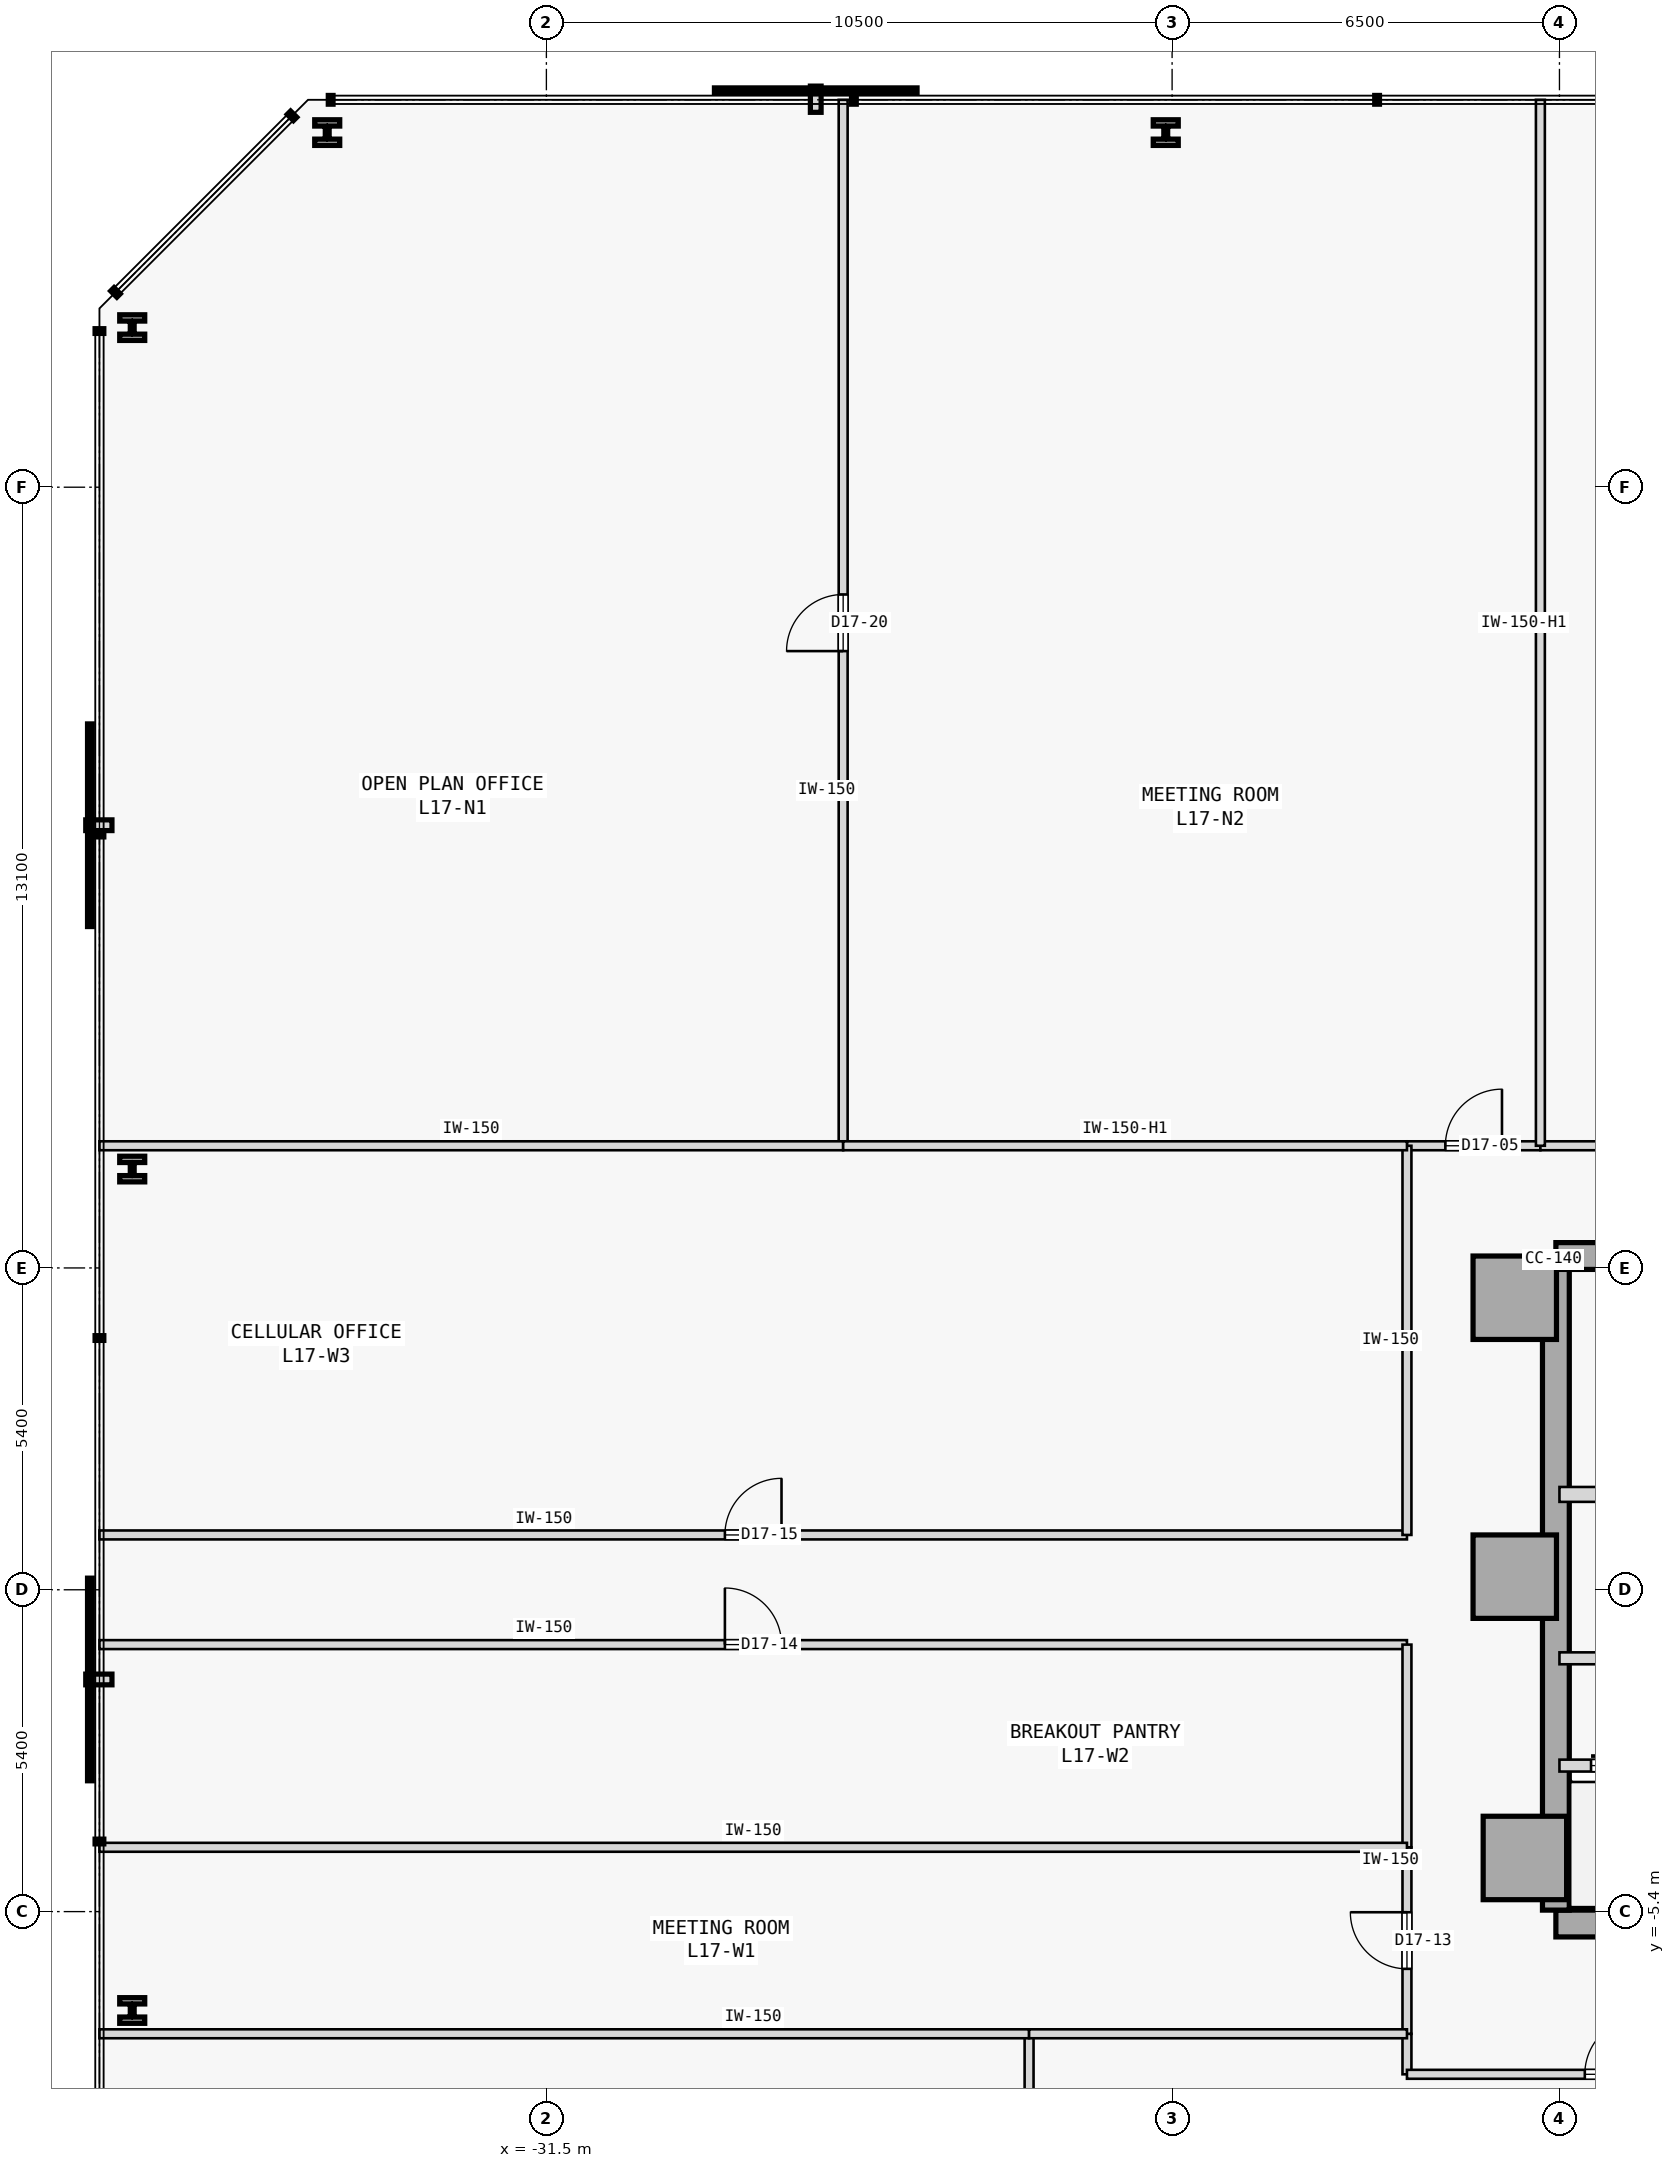
"""IFC4 building model, lengths in metres.
Left out: names, types, materials, properties, quantities, classifications, styles, units other than length and angle.
Written with IfcOpenShell. Run it as: python <this file> out.ifc"""

import sys

from ifc_helpers import new_model, si_unit, direction, frame, frame_2d, origin, origin_2d, place, context, subcontext, project, spatial, rectangle, i_section, extrude, element, fill, save


model = new_model("IFC4")
c1 = context("Model", 3, precision=1e-05, world=origin(), true_north=direction((0.0, 1.0)))
c2 = subcontext(c1, "Body", "Model", "MODEL_VIEW")
j1 = project(units=[si_unit("LENGTHUNIT", "METRE"), si_unit("PLANEANGLEUNIT", "RADIAN")], contexts=[c1])
p1 = place(None, origin())
s1 = spatial("IfcSite", under=j1, at=p1, CompositionType="ELEMENT")
p2 = place(p1, origin())
s2 = spatial("IfcBuilding", under=s1, at=p2, CompositionType="ELEMENT")
p3 = place(p2, frame((0.0, 0.0, 71.2)))
s3 = spatial("IfcBuildingStorey", under=s2, at=p3, CompositionType="ELEMENT", Elevation=71.2)
for number, where, z_axis, x_axis in (
    (1, (-15.25, 4.9, 0.0), (0.0, 0.0, 1.0), (1.0, 0.0, 0.0)),
    (2, (-15.25, 0.22, 0.0), (0.0, 0.0, 1.0), (1.0, 0.0, 0.0)),
    (3, (-15.08, -4.5, 0.0), (0.0, 0.0, 1.0), (1.0, 0.0, 0.0)),
):
    element("IfcColumn", number, at=place(p3, frame(where, z_axis=z_axis, x_axis=x_axis)), inside=s3, PredefinedType="COLUMN", context=c2, shape_type="SweptSolid", body=[
        extrude(rectangle(XDim=1.4, YDim=1.4, at=origin_2d()), origin(), (0.0, 0.0, 1.0), 3.8),
    ])
p4 = place(p3, frame((-14.56, 5.6, 0.0), z_axis=(0.0, 0.0, 1.0), x_axis=(1.0, 0.0, 0.0)))
e4 = element("IfcWall", 4, at=p4, inside=s3, PredefinedType="SHEAR", context=c2, shape_type="SweptSolid", body=[
    extrude(rectangle(XDim=11.41, YDim=0.45, at=frame_2d((5.705, 0.0))), origin(), (0.0, 0.0, 1.0), 3.575),
])
p5 = place(p3, frame((-14.56, -5.6, 0.0), z_axis=(0.0, 0.0, 1.0), x_axis=(1.0, 0.0, 0.0)))
e5 = element("IfcWall", 5, at=p5, inside=s3, PredefinedType="SHEAR", context=c2, shape_type="SweptSolid", body=[
    extrude(rectangle(XDim=10.86, YDim=0.45, at=frame_2d((5.43, 0.0))), origin(), (0.0, 0.0, 1.0), 3.575),
])
p6 = place(p3, frame((-14.56, -5.375, 0.0), z_axis=(0.0, 0.0, 1.0), x_axis=(0.0, 1.0, 0.0)))
e6 = element("IfcWall", 6, at=p6, inside=s3, PredefinedType="SHEAR", context=c2, shape_type="SweptSolid", body=[
    extrude(rectangle(XDim=10.75, YDim=0.45, at=frame_2d((5.375, 0.0))), origin(), (0.0, 0.0, 1.0), 3.575),
])
for number, where, z_axis, x_axis in (
    (7, (-21.107, 24.45, 0.0), (0.0, 0.0, 1.0), (1.0, 0.0, 0.0)),
    (8, (-35.178, 24.45, 0.0), (0.0, 0.0, 1.0), (1.0, 0.0, 0.0)),
    (9, (-38.45, 21.178, 0.0), (0.0, 0.0, 1.0), (1.0, 0.0, 0.0)),
    (10, (-38.45, 7.059, 0.0), (0.0, 0.0, 1.0), (1.0, 0.0, 0.0)),
    (11, (-38.45, -7.059, 0.0), (0.0, 0.0, 1.0), (1.0, 0.0, 0.0)),
):
    element("IfcColumn", number, at=place(p3, frame(where, z_axis=z_axis, x_axis=x_axis)), inside=s3, PredefinedType="COLUMN", context=c2, shape_type="SweptSolid", body=[
        extrude(i_section(OverallWidth=0.42, OverallDepth=0.431, WebThickness=0.065, FlangeThickness=0.106, FilletRadius=0.015, at=origin_2d()), origin(), (0.0, 0.0, 1.0), 3.8),
    ])
p7 = place(p3, frame((-14.5, 1.6, 0.0), z_axis=(0.0, 0.0, 1.0), x_axis=(1.0, 0.0, 0.0)))
e12 = element("IfcWall", 12, at=p7, inside=s3, PredefinedType="STANDARD", context=c2, shape_type="SweptSolid", body=[
    extrude(rectangle(XDim=3.6, YDim=0.25, at=frame_2d((1.8, 0.0))), origin(), (0.0, 0.0, 1.0), 3.575),
])
p8 = place(p7, frame((0.92, 0.0, 0.0)))
e13 = element("IfcOpeningElement", 13, at=p8, cuts=e12, PredefinedType="OPENING", context=c2, shape_type="SweptSolid", body=[
    extrude(rectangle(XDim=1.05, YDim=2.15, at=frame_2d((0.525, 1.075))), frame((0.0, 0.135, 0.0), z_axis=(0.0, -1.0, 0.0), x_axis=(1.0, 0.0, 0.0)), (0.0, 0.0, 1.0), 0.27),
])
p9 = place(p3, frame((-14.5, -1.15, 0.0), z_axis=(0.0, 0.0, 1.0), x_axis=(1.0, 0.0, 0.0)))
e14 = element("IfcWall", 14, at=p9, inside=s3, PredefinedType="STANDARD", context=c2, shape_type="SweptSolid", body=[
    extrude(rectangle(XDim=2.95, YDim=0.2, at=frame_2d((1.475, 0.0))), origin(), (0.0, 0.0, 1.0), 3.575),
])
p10 = place(p9, frame((0.75, 0.0, 0.0)))
e15 = element("IfcOpeningElement", 15, at=p10, cuts=e14, PredefinedType="OPENING", context=c2, shape_type="SweptSolid", body=[
    extrude(rectangle(XDim=1.05, YDim=2.18, at=frame_2d((0.525, 1.09))), frame((0.0, 0.11, 0.0), z_axis=(0.0, -1.0, 0.0), x_axis=(1.0, 0.0, 0.0)), (0.0, 0.0, 1.0), 0.22),
])
p11 = place(p3, frame((-14.5, -2.95, 0.0), z_axis=(0.0, 0.0, 1.0), x_axis=(1.0, 0.0, 0.0)))
e16 = element("IfcWall", 16, at=p11, inside=s3, PredefinedType="STANDARD", context=c2, shape_type="SweptSolid", body=[
    extrude(rectangle(XDim=10.8, YDim=0.2, at=frame_2d((5.4, 0.0))), origin(), (0.0, 0.0, 1.0), 3.575),
])
p12 = place(p11, frame((0.53, 0.0, 0.0)))
e17 = element("IfcOpeningElement", 17, at=p12, cuts=e16, PredefinedType="OPENING", context=c2, shape_type="SweptSolid", body=[
    extrude(rectangle(XDim=1.1, YDim=2.15, at=frame_2d((0.55, 1.075))), frame((0.0, 0.11, 0.0), z_axis=(0.0, -1.0, 0.0), x_axis=(1.0, 0.0, 0.0)), (0.0, 0.0, 1.0), 0.22),
])
p13 = place(p11, frame((2.69, 0.0, 0.0)))
e18 = element("IfcOpeningElement", 18, at=p13, cuts=e16, PredefinedType="OPENING", context=c2, shape_type="SweptSolid", body=[
    extrude(rectangle(XDim=1.1, YDim=2.15, at=frame_2d((0.55, 1.075))), frame((0.0, 0.11, 0.0), z_axis=(0.0, -1.0, 0.0), x_axis=(1.0, 0.0, 0.0)), (0.0, 0.0, 1.0), 0.22),
])
p14 = place(p3, frame((-17.059, 7.45, 0.0), z_axis=(0.0, 0.0, 1.0), x_axis=(1.0, 0.0, 0.0)))
e19 = element("IfcWall", 19, at=p14, inside=s3, PredefinedType="PARTITIONING", context=c2, shape_type="SweptSolid", body=[
    extrude(rectangle(XDim=2.239, YDim=0.15, at=frame_2d((1.12, 0.0))), origin(), (0.0, 0.0, 1.0), 3.575),
])
p15 = place(p14, frame((0.645, 0.0, 0.0)))
e20 = element("IfcOpeningElement", 20, at=p15, cuts=e19, PredefinedType="OPENING", context=c2, shape_type="SweptSolid", body=[
    extrude(rectangle(XDim=0.95, YDim=2.15, at=frame_2d((0.475, 1.075))), frame((0.0, 0.085, 0.0), z_axis=(0.0, -1.0, 0.0), x_axis=(1.0, 0.0, 0.0)), (0.0, 0.0, 1.0), 0.17),
])
p16 = place(p3, frame((-14.82, 7.45, 0.0), z_axis=(0.0, 0.0, 1.0), x_axis=(1.0, 0.0, 0.0)))
e21 = element("IfcWall", 21, at=p16, inside=s3, PredefinedType="PARTITIONING", context=c2, shape_type="SweptSolid", body=[
    extrude(rectangle(XDim=13.9, YDim=0.15, at=frame_2d((6.95, 0.0))), origin(), (0.0, 0.0, 1.0), 3.575),
])
p17 = place(p3, frame((-17.059, -8.13, 0.0), z_axis=(0.0, 0.0, 1.0), x_axis=(0.0, 1.0, 0.0)))
e22 = element("IfcWall", 22, at=p17, inside=s3, PredefinedType="PARTITIONING", context=c2, shape_type="SweptSolid", body=[
    extrude(rectangle(XDim=0.68, YDim=0.15, at=frame_2d((0.34, 0.0))), origin(), (0.0, 0.0, 1.0), 3.575),
])
p18 = place(p3, frame((-17.059, -8.13, 0.0), z_axis=(0.0, 0.0, 1.0), x_axis=(1.0, 0.0, 0.0)))
e23 = element("IfcWall", 23, at=p18, inside=s3, PredefinedType="PARTITIONING", context=c2, shape_type="SweptSolid", body=[
    extrude(rectangle(XDim=6.919, YDim=0.15, at=frame_2d((3.459, 0.0))), origin(), (0.0, 0.0, 1.0), 3.575),
])
p19 = place(p18, frame((2.985, 0.0, 0.0)))
e24 = element("IfcOpeningElement", 24, at=p19, cuts=e23, PredefinedType="OPENING", context=c2, shape_type="SweptSolid", body=[
    extrude(rectangle(XDim=0.95, YDim=2.15, at=frame_2d((0.475, 1.075))), frame((0.0, 0.085, 0.0), z_axis=(0.0, -1.0, 0.0), x_axis=(1.0, 0.0, 0.0)), (0.0, 0.0, 1.0), 0.17),
])
p20 = place(p3, frame((-17.059, -7.45, 0.0), z_axis=(0.0, 0.0, 1.0), x_axis=(0.0, 1.0, 0.0)))
e25 = element("IfcWall", 25, at=p20, inside=s3, PredefinedType="PARTITIONING", context=c2, shape_type="SweptSolid", body=[
    extrude(rectangle(XDim=3.129, YDim=0.15, at=frame_2d((1.564, 0.0))), origin(), (0.0, 0.0, 1.0), 3.575),
])
p21 = place(p20, frame((1.09, 0.0, 0.0)))
e26 = element("IfcOpeningElement", 26, at=p21, cuts=e25, PredefinedType="OPENING", context=c2, shape_type="SweptSolid", body=[
    extrude(rectangle(XDim=0.95, YDim=2.15, at=frame_2d((0.475, 1.075))), frame((0.0, 0.085, 0.0), z_axis=(0.0, -1.0, 0.0), x_axis=(1.0, 0.0, 0.0)), (0.0, 0.0, 1.0), 0.17),
])
p22 = place(p3, frame((-39.0, -0.92, 0.0), z_axis=(0.0, 0.0, 1.0), x_axis=(1.0, 0.0, 0.0)))
e27 = element("IfcWall", 27, at=p22, inside=s3, PredefinedType="PARTITIONING", context=c2, shape_type="SweptSolid", body=[
    extrude(rectangle(XDim=21.941, YDim=0.15, at=frame_2d((10.97, 0.0))), origin(), (0.0, 0.0, 1.0), 3.575),
])
p23 = place(p22, frame((10.496, 0.0, 0.0)))
e28 = element("IfcOpeningElement", 28, at=p23, cuts=e27, PredefinedType="OPENING", context=c2, shape_type="SweptSolid", body=[
    extrude(rectangle(XDim=0.95, YDim=2.15, at=frame_2d((0.475, 1.075))), frame((0.0, 0.085, 0.0), z_axis=(0.0, -1.0, 0.0), x_axis=(1.0, 0.0, 0.0)), (0.0, 0.0, 1.0), 0.17),
])
p24 = place(p3, frame((-17.059, -4.321, 0.0), z_axis=(0.0, 0.0, 1.0), x_axis=(0.0, 1.0, 0.0)))
e29 = element("IfcWall", 29, at=p24, inside=s3, PredefinedType="PARTITIONING", context=c2, shape_type="SweptSolid", body=[
    extrude(rectangle(XDim=3.401, YDim=0.15, at=frame_2d((1.701, 0.0))), origin(), (0.0, 0.0, 1.0), 3.575),
])
p25 = place(p3, frame((-39.0, 0.92, 0.0), z_axis=(0.0, 0.0, 1.0), x_axis=(1.0, 0.0, 0.0)))
e30 = element("IfcWall", 30, at=p25, inside=s3, PredefinedType="PARTITIONING", context=c2, shape_type="SweptSolid", body=[
    extrude(rectangle(XDim=21.941, YDim=0.15, at=frame_2d((10.97, 0.0))), origin(), (0.0, 0.0, 1.0), 3.575),
])
p26 = place(p25, frame((10.496, 0.0, 0.0)))
e31 = element("IfcOpeningElement", 31, at=p26, cuts=e30, PredefinedType="OPENING", context=c2, shape_type="SweptSolid", body=[
    extrude(rectangle(XDim=0.95, YDim=2.15, at=frame_2d((0.475, 1.075))), frame((0.0, 0.085, 0.0), z_axis=(0.0, -1.0, 0.0), x_axis=(1.0, 0.0, 0.0)), (0.0, 0.0, 1.0), 0.17),
])
p27 = place(p3, frame((-17.059, 0.92, 0.0), z_axis=(0.0, 0.0, 1.0), x_axis=(0.0, 1.0, 0.0)))
e32 = element("IfcWall", 32, at=p27, inside=s3, PredefinedType="PARTITIONING", context=c2, shape_type="SweptSolid", body=[
    extrude(rectangle(XDim=6.53, YDim=0.15, at=frame_2d((3.265, 0.0))), origin(), (0.0, 0.0, 1.0), 3.575),
])
p28 = place(p3, frame((-26.52, 7.45, 0.0), z_axis=(0.0, 0.0, 1.0), x_axis=(0.0, 1.0, 0.0)))
e33 = element("IfcWall", 33, at=p28, inside=s3, PredefinedType="PARTITIONING", context=c2, shape_type="SweptSolid", body=[
    extrude(rectangle(XDim=17.55, YDim=0.15, at=frame_2d((8.775, 0.0))), origin(), (0.0, 0.0, 1.0), 3.575),
])
p29 = place(p28, frame((8.3, 0.0, 0.0)))
e34 = element("IfcOpeningElement", 34, at=p29, cuts=e33, PredefinedType="OPENING", context=c2, shape_type="SweptSolid", body=[
    extrude(rectangle(XDim=0.95, YDim=2.15, at=frame_2d((0.475, 1.075))), frame((0.0, 0.085, 0.0), z_axis=(0.0, -1.0, 0.0), x_axis=(1.0, 0.0, 0.0)), (0.0, 0.0, 1.0), 0.17),
])
p30 = place(p3, frame((-39.0, 7.45, 0.0), z_axis=(0.0, 0.0, 1.0), x_axis=(1.0, 0.0, 0.0)))
e35 = element("IfcWall", 35, at=p30, inside=s3, PredefinedType="PARTITIONING", context=c2, shape_type="SweptSolid", body=[
    extrude(rectangle(XDim=12.48, YDim=0.15, at=frame_2d((6.24, 0.0))), origin(), (0.0, 0.0, 1.0), 3.575),
])
p31 = place(p3, frame((-14.82, 7.45, 0.0), z_axis=(0.0, 0.0, 1.0), x_axis=(0.0, 1.0, 0.0)))
e36 = element("IfcWall", 36, at=p31, inside=s3, PredefinedType="PARTITIONING", context=c2, shape_type="SweptSolid", body=[
    extrude(rectangle(XDim=17.55, YDim=0.15, at=frame_2d((8.775, 0.0))), origin(), (0.0, 0.0, 1.0), 3.125),
])
p32 = place(p3, frame((-26.52, 7.45, 0.0), z_axis=(0.0, 0.0, 1.0), x_axis=(1.0, 0.0, 0.0)))
e37 = element("IfcWall", 37, at=p32, inside=s3, PredefinedType="PARTITIONING", context=c2, shape_type="SweptSolid", body=[
    extrude(rectangle(XDim=9.461, YDim=0.15, at=frame_2d((4.73, 0.0))), origin(), (0.0, 0.0, 1.0), 3.125),
])
p33 = place(p3, frame((-23.4, -25.0, 0.0), z_axis=(0.0, 0.0, 1.0), x_axis=(0.0, 1.0, 0.0)))
e38 = element("IfcWall", 38, at=p33, inside=s3, PredefinedType="PARTITIONING", context=c2, shape_type="SweptSolid", body=[
    extrude(rectangle(XDim=17.55, YDim=0.15, at=frame_2d((8.775, 0.0))), origin(), (0.0, 0.0, 1.0), 3.575),
])
p34 = place(p33, frame((8.3, 0.0, 0.0)))
e39 = element("IfcOpeningElement", 39, at=p34, cuts=e38, PredefinedType="OPENING", context=c2, shape_type="SweptSolid", body=[
    extrude(rectangle(XDim=0.95, YDim=2.15, at=frame_2d((0.475, 1.075))), frame((0.0, 0.085, 0.0), z_axis=(0.0, -1.0, 0.0), x_axis=(1.0, 0.0, 0.0)), (0.0, 0.0, 1.0), 0.17),
])
p35 = place(p3, frame((-39.0, -7.45, 0.0), z_axis=(0.0, 0.0, 1.0), x_axis=(1.0, 0.0, 0.0)))
e40 = element("IfcWall", 40, at=p35, inside=s3, PredefinedType="PARTITIONING", context=c2, shape_type="SweptSolid", body=[
    extrude(rectangle(XDim=15.6, YDim=0.15, at=frame_2d((7.8, 0.0))), origin(), (0.0, 0.0, 1.0), 3.575),
])
p36 = place(p3, frame((-23.4, -7.45, 0.0), z_axis=(0.0, 0.0, 1.0), x_axis=(1.0, 0.0, 0.0)))
e41 = element("IfcWall", 41, at=p36, inside=s3, PredefinedType="PARTITIONING", context=c2, shape_type="SweptSolid", body=[
    extrude(rectangle(XDim=6.341, YDim=0.15, at=frame_2d((3.17, 0.0))), origin(), (0.0, 0.0, 1.0), 3.575),
])
p37 = place(p3, frame((-39.0, -4.321, 0.0), z_axis=(0.0, 0.0, 1.0), x_axis=(1.0, 0.0, 0.0)))
e42 = element("IfcWall", 42, at=p37, inside=s3, PredefinedType="PARTITIONING", context=c2, shape_type="SweptSolid", body=[
    extrude(rectangle(XDim=21.941, YDim=0.15, at=frame_2d((10.97, 0.0))), origin(), (0.0, 0.0, 1.0), 3.575),
])
p38 = place(p12, origin())
e43 = element("IfcDoor", 43, at=p38, inside=s3, OperationType="SLIDING_TO_RIGHT", PredefinedType="DOOR", context=c2, shape_type="SweptSolid", body=[
    extrude(rectangle(XDim=1.1, YDim=2.15, at=frame_2d((0.55, 1.075))), frame((0.0, 0.025, 0.0), z_axis=(0.0, -1.0, 0.0), x_axis=(1.0, 0.0, 0.0)), (0.0, 0.0, 1.0), 0.05),
])
fill(e17, e43)
p39 = place(p15, origin())
e44 = element("IfcDoor", 44, at=p39, inside=s3, OperationType="SINGLE_SWING_RIGHT", PredefinedType="DOOR", context=c2, shape_type="SweptSolid", body=[
    extrude(rectangle(XDim=0.95, YDim=2.15, at=frame_2d((0.475, 1.075))), frame((0.0, 0.025, 0.0), z_axis=(0.0, -1.0, 0.0), x_axis=(1.0, 0.0, 0.0)), (0.0, 0.0, 1.0), 0.05),
])
fill(e20, e44)
p40 = place(p19, origin())
e45 = element("IfcDoor", 45, at=p40, inside=s3, OperationType="SINGLE_SWING_RIGHT", PredefinedType="DOOR", context=c2, shape_type="SweptSolid", body=[
    extrude(rectangle(XDim=0.95, YDim=2.15, at=frame_2d((0.475, 1.075))), frame((0.0, 0.025, 0.0), z_axis=(0.0, -1.0, 0.0), x_axis=(1.0, 0.0, 0.0)), (0.0, 0.0, 1.0), 0.05),
])
fill(e24, e45)
p41 = place(p21, origin())
e46 = element("IfcDoor", 46, at=p41, inside=s3, OperationType="SINGLE_SWING_RIGHT", PredefinedType="DOOR", context=c2, shape_type="SweptSolid", body=[
    extrude(rectangle(XDim=0.95, YDim=2.15, at=frame_2d((0.475, 1.075))), frame((0.0, 0.025, 0.0), z_axis=(0.0, -1.0, 0.0), x_axis=(1.0, 0.0, 0.0)), (0.0, 0.0, 1.0), 0.05),
])
fill(e26, e46)
p42 = place(p23, origin())
e47 = element("IfcDoor", 47, at=p42, inside=s3, OperationType="SINGLE_SWING_LEFT", PredefinedType="DOOR", context=c2, shape_type="SweptSolid", body=[
    extrude(rectangle(XDim=0.95, YDim=2.15, at=frame_2d((0.475, 1.075))), frame((0.0, 0.025, 0.0), z_axis=(0.0, -1.0, 0.0), x_axis=(1.0, 0.0, 0.0)), (0.0, 0.0, 1.0), 0.05),
])
fill(e28, e47)
p43 = place(p26, origin())
e48 = element("IfcDoor", 48, at=p43, inside=s3, OperationType="SINGLE_SWING_RIGHT", PredefinedType="DOOR", context=c2, shape_type="SweptSolid", body=[
    extrude(rectangle(XDim=0.95, YDim=2.15, at=frame_2d((0.475, 1.075))), frame((0.0, 0.025, 0.0), z_axis=(0.0, -1.0, 0.0), x_axis=(1.0, 0.0, 0.0)), (0.0, 0.0, 1.0), 0.05),
])
fill(e31, e48)
p44 = place(p29, origin())
e49 = element("IfcDoor", 49, at=p44, inside=s3, OperationType="SINGLE_SWING_LEFT", PredefinedType="DOOR", context=c2, shape_type="SweptSolid", body=[
    extrude(rectangle(XDim=0.95, YDim=2.15, at=frame_2d((0.475, 1.075))), frame((0.0, 0.025, 0.0), z_axis=(0.0, -1.0, 0.0), x_axis=(1.0, 0.0, 0.0)), (0.0, 0.0, 1.0), 0.05),
])
fill(e34, e49)
save(model, sys.argv[1])
